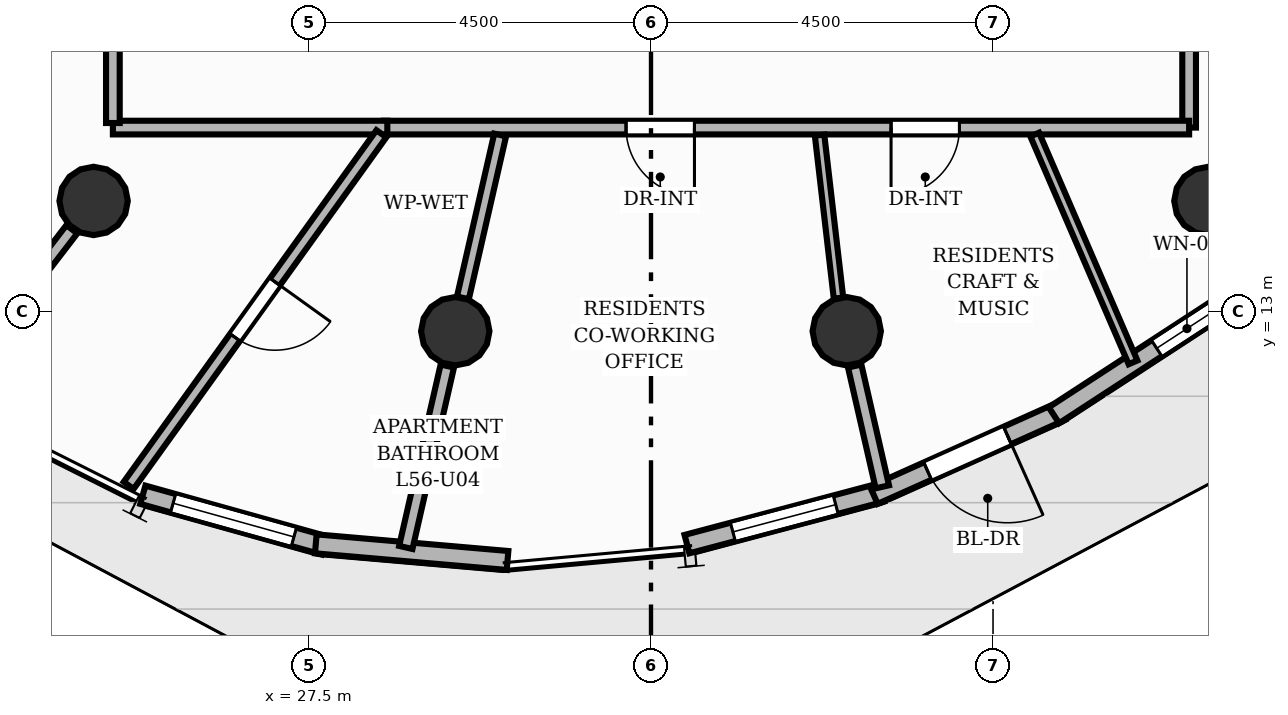
"""IFC4 building model, lengths in metres.
Left out: names, types, materials, properties, quantities, classifications, styles, units other than length and angle.
Written with IfcOpenShell. Run it as: python <this file> out.ifc"""

import sys

from ifc_helpers import new_model, si_unit, direction, frame, frame_2d, origin, origin_2d, place, context, subcontext, project, spatial, rectangle, circle, extrude, element, fill, save


model = new_model("IFC4")
c1 = context("Model", 3, precision=1e-05, world=origin(), true_north=direction((0.0, 1.0)))
c2 = subcontext(c1, "Body", "Model", "MODEL_VIEW")
j1 = project(units=[si_unit("LENGTHUNIT", "METRE"), si_unit("PLANEANGLEUNIT", "RADIAN")], contexts=[c1])
p1 = place(None, origin())
s1 = spatial("IfcSite", under=j1, at=p1, CompositionType="ELEMENT")
p2 = place(p1, origin())
s2 = spatial("IfcBuilding", under=s1, at=p2, CompositionType="ELEMENT")
p3 = place(p2, frame((0.0, 0.0, 188.64)))
s3 = spatial("IfcBuildingStorey", under=s2, at=p3, CompositionType="ELEMENT", Elevation=188.64)
for number, where, z_axis, x_axis in (
    (1, (24.667, 14.455, 0.0), (0.0, 0.0, 1.0), (1.0, 0.0, 0.0)),
    (2, (29.425, 12.74, 0.0), (0.0, 0.0, 1.0), (1.0, 0.0, 0.0)),
    (3, (34.575, 12.74, 0.0), (0.0, 0.0, 1.0), (1.0, 0.0, 0.0)),
    (4, (39.333, 14.455, 0.0), (0.0, 0.0, 1.0), (1.0, 0.0, 0.0)),
):
    element("IfcColumn", number, at=place(p3, frame(where, z_axis=z_axis, x_axis=x_axis)), inside=s3, PredefinedType="COLUMN", context=c2, shape_type="SweptSolid", body=[
        extrude(circle(Radius=0.45, at=origin_2d()), origin(), (0.0, 0.0, 1.0), 3.2),
    ])
p4 = place(p3, frame((27.701, 9.923, 0.0), z_axis=(0.0, 0.0, 1.0), x_axis=(-0.96316841201, 0.26889888454, 0.0)))
e5 = element("IfcWall", 5, at=p4, inside=s3, PredefinedType="SOLIDWALL", context=c2, shape_type="SweptSolid", body=[
    extrude(rectangle(XDim=2.478, YDim=0.25, at=frame_2d((1.239, 0.0))), origin(), (0.0, 0.0, 1.0), 2.96),
])
p5 = place(p4, frame((0.414, 0.0, 0.85)))
e6 = element("IfcOpeningElement", 6, at=p5, cuts=e5, PredefinedType="OPENING", context=c2, shape_type="SweptSolid", body=[
    extrude(rectangle(XDim=1.65, YDim=1.55, at=frame_2d((0.825, 0.775))), frame((0.0, 0.135, 0.0), z_axis=(0.0, -1.0, 0.0), x_axis=(1.0, 0.0, 0.0)), (0.0, 0.0, 1.0), 0.27),
])
p6 = place(p3, frame((30.112, 9.724, 0.0), z_axis=(0.0, 0.0, 1.0), x_axis=(-0.996260822813, 0.08639660252, 0.0)))
e7 = element("IfcWall", 7, at=p6, inside=s3, PredefinedType="SOLIDWALL", context=c2, shape_type="SweptSolid", body=[
    extrude(rectangle(XDim=2.532, YDim=0.25, at=frame_2d((1.266, 0.0))), origin(), (0.0, 0.0, 1.0), 2.96),
])
p7 = place(p3, frame((35.035, 10.619, 0.0), z_axis=(0.0, 0.0, 1.0), x_axis=(-0.96652474621, -0.256573410476, 0.0)))
e8 = element("IfcWall", 8, at=p7, inside=s3, PredefinedType="SOLIDWALL", context=c2, shape_type="SweptSolid", body=[
    extrude(rectangle(XDim=2.651, YDim=0.25, at=frame_2d((1.325, 0.0))), origin(), (0.0, 0.0, 1.0), 2.96),
])
p8 = place(p7, frame((0.626, 0.0, 0.85)))
e9 = element("IfcOpeningElement", 9, at=p8, cuts=e8, PredefinedType="OPENING", context=c2, shape_type="SweptSolid", body=[
    extrude(rectangle(XDim=1.4, YDim=1.55, at=frame_2d((0.7, 0.775))), frame((0.0, 0.135, 0.0), z_axis=(0.0, -1.0, 0.0), x_axis=(1.0, 0.0, 0.0)), (0.0, 0.0, 1.0), 0.27),
])
p9 = place(p3, frame((37.397, 11.687, 0.0), z_axis=(0.0, 0.0, 1.0), x_axis=(-0.912615139532, -0.408819773368, 0.0)))
e10 = element("IfcWall", 10, at=p9, inside=s3, PredefinedType="SOLIDWALL", context=c2, shape_type="SweptSolid", body=[
    extrude(rectangle(XDim=2.702, YDim=0.25, at=frame_2d((1.351, 0.0))), origin(), (0.0, 0.0, 1.0), 2.96),
])
p10 = place(p9, frame((0.776, 0.0, 0.0)))
e11 = element("IfcOpeningElement", 11, at=p10, cuts=e10, PredefinedType="OPENING", context=c2, shape_type="SweptSolid", body=[
    extrude(rectangle(XDim=1.15, YDim=2.2, at=frame_2d((0.575, 1.1))), frame((0.0, 0.135, 0.0), z_axis=(0.0, -1.0, 0.0), x_axis=(1.0, 0.0, 0.0)), (0.0, 0.0, 1.0), 0.27),
])
p11 = place(p3, frame((39.596, 13.13, 0.0), z_axis=(0.0, 0.0, 1.0), x_axis=(-0.837860586987, -0.545884270496, 0.0)))
e12 = element("IfcWall", 12, at=p11, inside=s3, PredefinedType="SOLIDWALL", context=c2, shape_type="SweptSolid", body=[
    extrude(rectangle(XDim=2.739, YDim=0.25, at=frame_2d((1.369, 0.0))), origin(), (0.0, 0.0, 1.0), 2.96),
])
p12 = place(p11, frame((0.175, 0.0, 0.85)))
e13 = element("IfcOpeningElement", 13, at=p12, cuts=e12, PredefinedType="OPENING", context=c2, shape_type="SweptSolid", body=[
    extrude(rectangle(XDim=0.95, YDim=1.45, at=frame_2d((0.475, 0.725))), frame((0.0, 0.135, 0.0), z_axis=(0.0, -1.0, 0.0), x_axis=(1.0, 0.0, 0.0)), (0.0, 0.0, 1.0), 0.27),
])
p13 = place(p3, frame((24.38, 14.082, 0.0), z_axis=(0.0, 0.0, 1.0), x_axis=(-0.609249164273, -0.792978849549, 0.0)))
e14 = element("IfcWall", 14, at=p13, inside=s3, PredefinedType="PARTITIONING", context=c2, shape_type="SweptSolid", body=[
    extrude(rectangle(XDim=2.557, YDim=0.18, at=frame_2d((1.278, 0.0))), origin(), (0.0, 0.0, 1.0), 2.404),
])
p14 = place(p3, frame((29.32, 12.282, 0.0), z_axis=(0.0, 0.0, 1.0), x_axis=(-0.222943921747, -0.974831271429, 0.0)))
e15 = element("IfcWall", 15, at=p14, inside=s3, PredefinedType="PARTITIONING", context=c2, shape_type="SweptSolid", body=[
    extrude(rectangle(XDim=2.448, YDim=0.18, at=frame_2d((1.224, 0.0))), origin(), (0.0, 0.0, 1.0), 2.404),
])
p15 = place(p3, frame((34.68, 12.282, 0.0), z_axis=(0.0, 0.0, 1.0), x_axis=(0.222967107114, -0.974825968645, 0.0)))
e16 = element("IfcWall", 16, at=p15, inside=s3, PredefinedType="PARTITIONING", context=c2, shape_type="SweptSolid", body=[
    extrude(rectangle(XDim=1.63, YDim=0.18, at=frame_2d((0.815, 0.0))), origin(), (0.0, 0.0, 1.0), 2.404),
])
p16 = place(p3, frame((39.08, 24.526, 0.0), z_axis=(0.0, 0.0, 1.0), x_axis=(0.0, -1.0, 0.0)))
e17 = element("IfcWall", 17, at=p16, inside=s3, PredefinedType="PARTITIONING", context=c2, shape_type="SweptSolid", body=[
    extrude(rectangle(XDim=9.106, YDim=0.18, at=frame_2d((4.553, 0.0))), origin(), (0.0, 0.0, 1.0), 2.955),
])
p17 = place(p16, frame((1.184, 0.0, 0.0)))
e18 = element("IfcOpeningElement", 18, at=p17, cuts=e17, PredefinedType="OPENING", context=c2, shape_type="SweptSolid", body=[
    extrude(rectangle(XDim=0.9, YDim=2.1, at=frame_2d((0.45, 1.05))), frame((0.0, 0.1, 0.0), z_axis=(0.0, -1.0, 0.0), x_axis=(1.0, 0.0, 0.0)), (0.0, 0.0, 1.0), 0.2),
])
p18 = place(p16, frame((5.716, 0.0, 0.0)))
e19 = element("IfcOpeningElement", 19, at=p18, cuts=e17, PredefinedType="OPENING", context=c2, shape_type="SweptSolid", body=[
    extrude(rectangle(XDim=0.9, YDim=2.1, at=frame_2d((0.45, 1.05))), frame((0.0, 0.1, 0.0), z_axis=(0.0, -1.0, 0.0), x_axis=(1.0, 0.0, 0.0)), (0.0, 0.0, 1.0), 0.2),
])
p19 = place(p3, frame((39.08, 15.42, 0.0), z_axis=(0.0, 0.0, 1.0), x_axis=(-1.0, 0.0, 0.0)))
e20 = element("IfcWall", 20, at=p19, inside=s3, PredefinedType="PARTITIONING", context=c2, shape_type="SweptSolid", body=[
    extrude(rectangle(XDim=10.594, YDim=0.18, at=frame_2d((5.297, 0.0))), origin(), (0.0, 0.0, 1.0), 2.955),
])
p20 = place(p19, frame((3.021, 0.0, 0.0)))
e21 = element("IfcOpeningElement", 21, at=p20, cuts=e20, PredefinedType="OPENING", context=c2, shape_type="SweptSolid", body=[
    extrude(rectangle(XDim=0.9, YDim=2.1, at=frame_2d((0.45, 1.05))), frame((0.0, 0.1, 0.0), z_axis=(0.0, -1.0, 0.0), x_axis=(1.0, 0.0, 0.0)), (0.0, 0.0, 1.0), 0.2),
])
p21 = place(p19, frame((6.508, 0.0, 0.0)))
e22 = element("IfcOpeningElement", 22, at=p21, cuts=e20, PredefinedType="OPENING", context=c2, shape_type="SweptSolid", body=[
    extrude(rectangle(XDim=0.9, YDim=2.1, at=frame_2d((0.45, 1.05))), frame((0.0, 0.1, 0.0), z_axis=(0.0, -1.0, 0.0), x_axis=(1.0, 0.0, 0.0)), (0.0, 0.0, 1.0), 0.2),
])
p22 = place(p3, frame((28.531, 15.42, 0.0), z_axis=(0.0, 0.0, 1.0), x_axis=(-1.0, 0.0, 0.0)))
e23 = element("IfcWall", 23, at=p22, inside=s3, PredefinedType="PARTITIONING", context=c2, shape_type="SweptSolid", body=[
    extrude(rectangle(XDim=3.611, YDim=0.18, at=frame_2d((1.805, 0.0))), origin(), (0.0, 0.0, 1.0), 2.955),
])
p23 = place(p3, frame((24.92, 15.48, 0.0), z_axis=(0.0, 0.0, 1.0), x_axis=(0.0, 1.0, 0.0)))
e24 = element("IfcWall", 24, at=p23, inside=s3, PredefinedType="PARTITIONING", context=c2, shape_type="SweptSolid", body=[
    extrude(rectangle(XDim=3.946, YDim=0.18, at=frame_2d((1.973, 0.0))), origin(), (0.0, 0.0, 1.0), 2.955),
])
p24 = place(p23, frame((1.448, 0.0, 0.0)))
e25 = element("IfcOpeningElement", 25, at=p24, cuts=e24, PredefinedType="OPENING", context=c2, shape_type="SweptSolid", body=[
    extrude(rectangle(XDim=1.05, YDim=2.15, at=frame_2d((0.525, 1.075))), frame((0.0, 0.1, 0.0), z_axis=(0.0, -1.0, 0.0), x_axis=(1.0, 0.0, 0.0)), (0.0, 0.0, 1.0), 0.2),
])
p25 = place(p3, frame((38.342, 12.331, 0.0), z_axis=(0.0, 0.0, 1.0), x_axis=(-0.396192482216, 0.918167477662, 0.0)))
e26 = element("IfcWall", 26, at=p25, inside=s3, PredefinedType="PARTITIONING", context=c2, shape_type="SweptSolid", body=[
    extrude(rectangle(XDim=3.265, YDim=0.125, at=frame_2d((1.632, 0.0))), origin(), (0.0, 0.0, 1.0), 2.692),
])
p26 = place(p3, frame((34.467, 13.176, 0.0), z_axis=(0.0, 0.0, 1.0), x_axis=(-0.115430815868, 0.993315522253, 0.0)))
e27 = element("IfcWall", 27, at=p26, inside=s3, PredefinedType="PARTITIONING", context=c2, shape_type="SweptSolid", body=[
    extrude(rectangle(XDim=2.159, YDim=0.125, at=frame_2d((1.08, 0.0))), origin(), (0.0, 0.0, 1.0), 2.404),
])
p27 = place(p3, frame((29.525, 13.179, 0.0), z_axis=(0.0, 0.0, 1.0), x_axis=(0.222969522248, 0.974825416241, 0.0)))
e28 = element("IfcWall", 28, at=p27, inside=s3, PredefinedType="PLUMBINGWALL", context=c2, shape_type="SweptSolid", body=[
    extrude(rectangle(XDim=2.199, YDim=0.16, at=frame_2d((1.099, 0.0))), origin(), (0.0, 0.0, 1.0), 2.404),
])
p28 = place(p3, frame((28.452, 15.339, 0.0), z_axis=(0.0, 0.0, 1.0), x_axis=(-0.583489481732, -0.812120695899, 0.0)))
e29 = element("IfcWall", 29, at=p28, inside=s3, PredefinedType="PLUMBINGWALL", context=c2, shape_type="SweptSolid", body=[
    extrude(rectangle(XDim=5.698, YDim=0.16, at=frame_2d((2.849, 0.0))), origin(), (0.0, 0.0, 1.0), 2.692),
])
p29 = place(p28, frame((2.399, 0.0, 0.0)))
e30 = element("IfcOpeningElement", 30, at=p29, cuts=e29, PredefinedType="OPENING", context=c2, shape_type="SweptSolid", body=[
    extrude(rectangle(XDim=0.9, YDim=2.1, at=frame_2d((0.45, 1.05))), frame((0.0, 0.09, 0.0), z_axis=(0.0, -1.0, 0.0), x_axis=(1.0, 0.0, 0.0)), (0.0, 0.0, 1.0), 0.18),
])
p30 = place(p3, frame((19.422, 15.838, 0.0), z_axis=(0.0, 0.0, 1.0), x_axis=(0.838876327826, 0.544322061479, 0.0)))
e31 = element("IfcWall", 31, at=p30, inside=s3, PredefinedType="PARTITIONING", context=c2, shape_type="SweptSolid", body=[
    extrude(rectangle(XDim=6.454, YDim=0.125, at=frame_2d((3.227, 0.0))), origin(), (0.0, 0.0, 1.0), 2.955),
])
p31 = place(p30, frame((4.419, 0.0, 0.0)))
e32 = element("IfcOpeningElement", 32, at=p31, cuts=e31, PredefinedType="OPENING", context=c2, shape_type="SweptSolid", body=[
    extrude(rectangle(XDim=0.9, YDim=2.1, at=frame_2d((0.45, 1.05))), frame((0.0, 0.073, 0.0), z_axis=(0.0, -1.0, 0.0), x_axis=(1.0, 0.0, 0.0)), (0.0, 0.0, 1.0), 0.145),
])
p32 = place(p10, origin())
e33 = element("IfcDoor", 33, at=p32, inside=s3, OperationType="SINGLE_SWING_LEFT", PredefinedType="DOOR", context=c2, shape_type="SweptSolid", body=[
    extrude(rectangle(XDim=1.15, YDim=2.2, at=frame_2d((0.575, 1.1))), frame((0.0, 0.025, 0.0), z_axis=(0.0, -1.0, 0.0), x_axis=(1.0, 0.0, 0.0)), (0.0, 0.0, 1.0), 0.05),
])
fill(e11, e33)
p33 = place(p5, origin())
e34 = element("IfcWindow", 34, at=p33, inside=s3, PartitioningType="SINGLE_PANEL", PredefinedType="WINDOW", context=c2, shape_type="SweptSolid", body=[
    extrude(rectangle(XDim=1.65, YDim=1.55, at=frame_2d((0.825, 0.775))), frame((0.0, 0.03, 0.0), z_axis=(0.0, -1.0, 0.0), x_axis=(1.0, 0.0, 0.0)), (0.0, 0.0, 1.0), 0.06),
])
fill(e6, e34)
p34 = place(p8, origin())
e35 = element("IfcWindow", 35, at=p34, inside=s3, PartitioningType="SINGLE_PANEL", PredefinedType="WINDOW", context=c2, shape_type="SweptSolid", body=[
    extrude(rectangle(XDim=1.4, YDim=1.55, at=frame_2d((0.7, 0.775))), frame((0.0, 0.03, 0.0), z_axis=(0.0, -1.0, 0.0), x_axis=(1.0, 0.0, 0.0)), (0.0, 0.0, 1.0), 0.06),
])
fill(e9, e35)
p35 = place(p12, origin())
e36 = element("IfcWindow", 36, at=p35, inside=s3, PartitioningType="SINGLE_PANEL", PredefinedType="WINDOW", context=c2, shape_type="SweptSolid", body=[
    extrude(rectangle(XDim=0.95, YDim=1.45, at=frame_2d((0.475, 0.725))), frame((0.0, 0.03, 0.0), z_axis=(0.0, -1.0, 0.0), x_axis=(1.0, 0.0, 0.0)), (0.0, 0.0, 1.0), 0.06),
])
fill(e13, e36)
p36 = place(p20, origin())
e37 = element("IfcDoor", 37, at=p36, inside=s3, OperationType="SINGLE_SWING_RIGHT", PredefinedType="DOOR", context=c2, shape_type="SweptSolid", body=[
    extrude(rectangle(XDim=0.9, YDim=2.1, at=frame_2d((0.45, 1.05))), frame((0.0, 0.025, 0.0), z_axis=(0.0, -1.0, 0.0), x_axis=(1.0, 0.0, 0.0)), (0.0, 0.0, 1.0), 0.05),
])
fill(e21, e37)
p37 = place(p21, origin())
e38 = element("IfcDoor", 38, at=p37, inside=s3, OperationType="SINGLE_SWING_LEFT", PredefinedType="DOOR", context=c2, shape_type="SweptSolid", body=[
    extrude(rectangle(XDim=0.9, YDim=2.1, at=frame_2d((0.45, 1.05))), frame((0.0, 0.025, 0.0), z_axis=(0.0, -1.0, 0.0), x_axis=(1.0, 0.0, 0.0)), (0.0, 0.0, 1.0), 0.05),
])
fill(e22, e38)
p38 = place(p29, origin())
e39 = element("IfcDoor", 39, at=p38, inside=s3, OperationType="SINGLE_SWING_LEFT", PredefinedType="DOOR", context=c2, shape_type="SweptSolid", body=[
    extrude(rectangle(XDim=0.9, YDim=2.1, at=frame_2d((0.45, 1.05))), frame((0.0, 0.025, 0.0), z_axis=(0.0, -1.0, 0.0), x_axis=(1.0, 0.0, 0.0)), (0.0, 0.0, 1.0), 0.05),
])
fill(e30, e39)
save(model, sys.argv[1])
